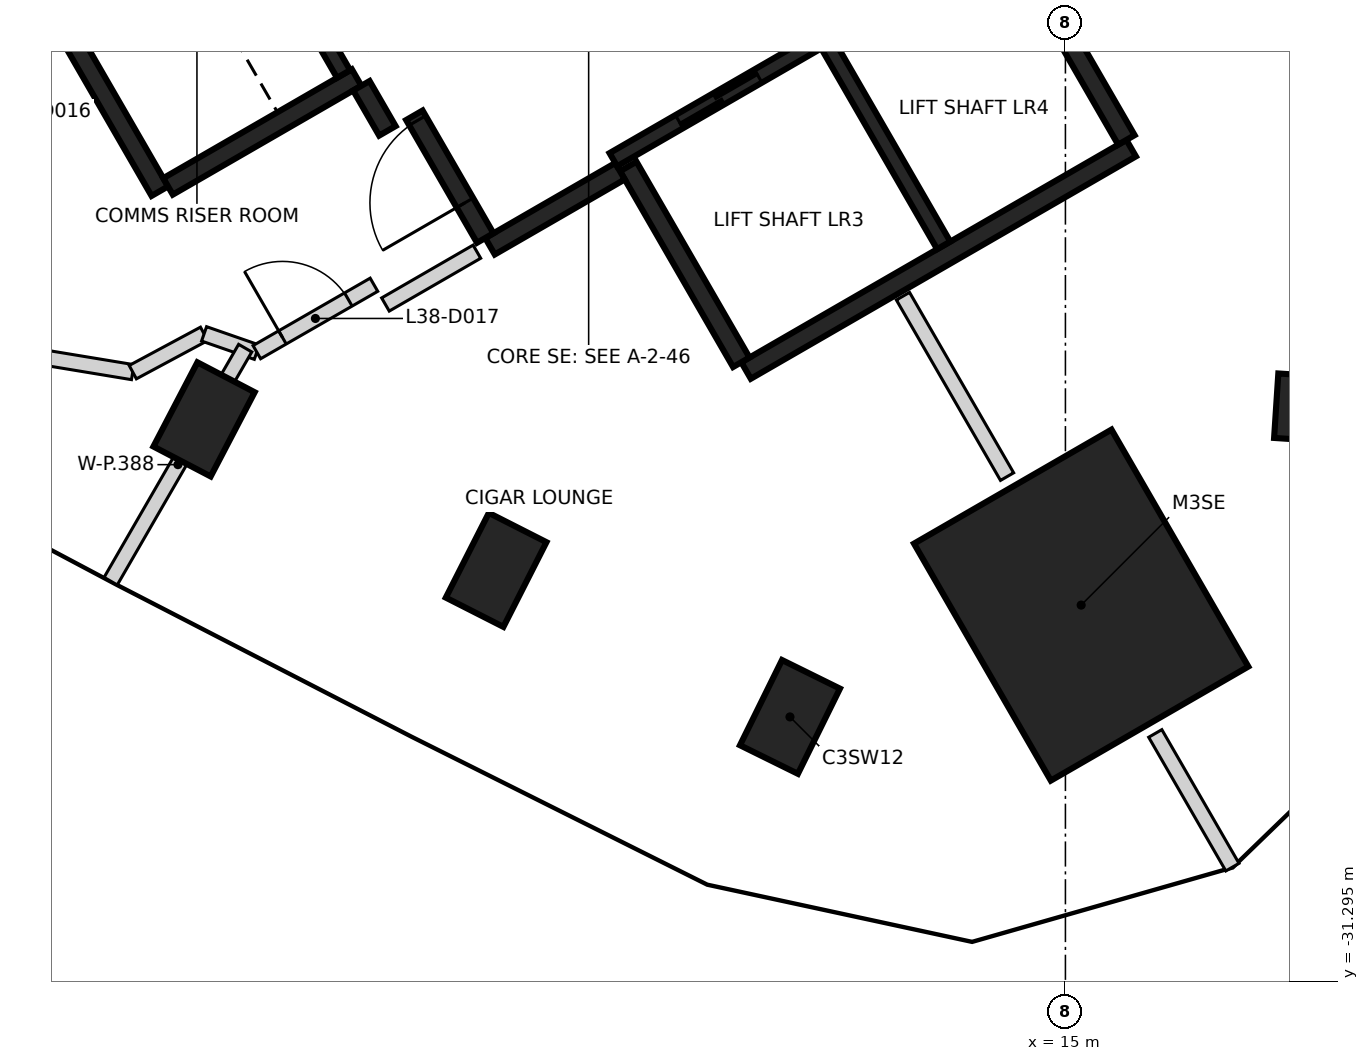
"""IFC4 building model, lengths in metres.
Left out: names, types, materials, properties, quantities, classifications, styles, units other than length and angle.
Written with IfcOpenShell. Run it as: python <this file> out.ifc"""

import sys

from ifc_helpers import new_model, si_unit, direction, frame, frame_2d, origin, origin_2d, place, context, subcontext, project, spatial, rectangle, extrude, element, fill, save


model = new_model("IFC4")
c1 = context("Model", 3, precision=1e-05, world=origin(), true_north=direction((0.0, 1.0)))
c2 = subcontext(c1, "Body", "Model", "MODEL_VIEW")
j1 = project(units=[si_unit("LENGTHUNIT", "METRE"), si_unit("PLANEANGLEUNIT", "RADIAN")], contexts=[c1])
p1 = place(None, origin())
s1 = spatial("IfcSite", under=j1, at=p1, CompositionType="ELEMENT")
p2 = place(p1, origin())
s2 = spatial("IfcBuilding", under=s1, at=p2, CompositionType="ELEMENT")
p3 = place(p2, frame((0.0, 0.0, 154.0)))
s3 = spatial("IfcBuildingStorey", under=s2, at=p3, CompositionType="ELEMENT", Elevation=154.0)
for number, where, z_axis, x_axis in (
    (1, (18.397, -23.757, -0.4), (0.0, 0.0, 1.0), (-0.998, 0.065, 0.0)),
    (2, (3.667, -23.896, -0.4), (0.0, 0.0, 1.0), (0.463, 0.886, 0.0)),
    (3, (7.51, -25.876, -0.4), (0.0, 0.0, 1.0), (0.453, 0.892, 0.0)),
    (4, (11.376, -27.811, -0.4), (0.0, 0.0, 1.0), (0.442, 0.897, 0.0)),
):
    element("IfcColumn", number, at=place(p3, frame(where, z_axis=z_axis, x_axis=x_axis)), inside=s3, PredefinedType="COLUMN", context=c2, shape_type="SweptSolid", body=[
        extrude(rectangle(XDim=1.25, YDim=0.85, at=origin_2d()), origin(), (0.0, 0.0, 1.0), 3.6),
    ])
p4 = place(p3, frame((15.207, -26.34, -0.4), z_axis=(0.0, 0.0, 1.0), x_axis=(-0.5, 0.866025403784, 0.0)))
e5 = element("IfcColumn", 5, at=p4, inside=s3, PredefinedType="COLUMN", context=c2, shape_type="SweptSolid", body=[
    extrude(rectangle(XDim=3.6, YDim=3.0, at=origin_2d()), origin(), (0.0, 0.0, 1.0), 3.6),
])
p5 = place(p3, frame((15.865, -20.328, 0.0), z_axis=(0.0, 0.0, 1.0), x_axis=(-0.86602852612, -0.499994591916, 0.0)))
e6 = element("IfcWall", 6, at=p5, inside=s3, PredefinedType="SHEAR", context=c2, shape_type="SweptSolid", body=[
    extrude(rectangle(XDim=5.85, YDim=0.25, at=frame_2d((2.925, 0.0))), origin(), (0.0, 0.0, 1.0), 3.2),
])
for number, where, z_axis, x_axis in (
    (7, (14.315, -17.644, 0.0), (0.0, 0.0, 1.0), (0.5, -0.866, 0.0)),
    (8, (10.736, -23.145, 0.0), (0.0, 0.0, 1.0), (-0.5, 0.866, 0.0)),
):
    element("IfcWall", number, at=place(p3, frame(where, z_axis=z_axis, x_axis=x_axis)), inside=s3, PredefinedType="SHEAR", context=c2, shape_type="SweptSolid", body=[
        extrude(rectangle(XDim=2.974, YDim=0.25, at=frame_2d((1.487, 0.0))), origin(), (0.0, 0.0, 1.0), 3.2),
    ])
p6 = place(p3, frame((3.085, -20.894, 0.0), z_axis=(0.0, 0.0, 1.0), x_axis=(-0.499978833458, 0.866037623948, 0.0)))
e9 = element("IfcWall", 9, at=p6, inside=s3, PredefinedType="SHEAR", context=c2, shape_type="SweptSolid", body=[
    extrude(rectangle(XDim=3.05, YDim=0.25, at=frame_2d((1.525, 0.0))), origin(), (0.0, 0.0, 1.0), 3.2),
])
p7 = place(p3, frame((5.675, -19.399, 0.0), z_axis=(0.0, 0.0, 1.0), x_axis=(-0.866026637627, -0.499997862916, 0.0)))
e10 = element("IfcWall", 10, at=p7, inside=s3, PredefinedType="SHEAR", context=c2, shape_type="SweptSolid", body=[
    extrude(rectangle(XDim=2.865, YDim=0.25, at=frame_2d((1.432, 0.0))), origin(), (0.0, 0.0, 1.0), 3.2),
])
p8 = place(p3, frame((9.14, -20.631, 0.0), z_axis=(0.0, 0.0, 1.0), x_axis=(-0.866043531843, -0.499968599967, 0.0)))
e11 = element("IfcWall", 11, at=p8, inside=s3, PredefinedType="SHEAR", context=c2, shape_type="SweptSolid", body=[
    extrude(rectangle(XDim=1.975, YDim=0.25, at=frame_2d((0.987, 0.0))), origin(), (0.0, 0.0, 1.0), 3.2),
])
p9 = place(p3, frame((7.367, -21.51, 0.0), z_axis=(0.0, 0.0, 1.0), x_axis=(-0.499983108224, 0.866035156036, 0.0)))
e12 = element("IfcWall", 12, at=p9, inside=s3, PredefinedType="SHEAR", context=c2, shape_type="SweptSolid", body=[
    extrude(rectangle(XDim=1.865, YDim=0.25, at=frame_2d((0.932, 0.0))), origin(), (0.0, 0.0, 1.0), 3.2),
])
p10 = place(p9, frame((0.535, 0.0, 0.0)))
e13 = element("IfcOpeningElement", 13, at=p10, cuts=e12, PredefinedType="OPENING", context=c2, shape_type="SweptSolid", body=[
    extrude(rectangle(XDim=1.25, YDim=2.1, at=frame_2d((0.625, 1.05))), frame((0.0, 0.135, 0.0), z_axis=(0.0, -1.0, 0.0), x_axis=(1.0, 0.0, 0.0)), (0.0, 0.0, 1.0), 0.27),
])
p11 = place(p3, frame((6.08, -20.1, 0.0), z_axis=(0.0, 0.0, 1.0), x_axis=(-0.500051773299, 0.865995510393, 0.0)))
e14 = element("IfcWall", 14, at=p11, inside=s3, PredefinedType="SHEAR", context=c2, shape_type="SweptSolid", body=[
    extrude(rectangle(XDim=0.685, YDim=0.25, at=frame_2d((0.342, 0.0))), origin(), (0.0, 0.0, 1.0), 3.2),
])
p12 = place(p3, frame((9.052, -20.48, 0.0), z_axis=(0.0, 0.0, 1.0), x_axis=(0.866030299012, 0.499991521122, 0.0)))
e15 = element("IfcWall", 15, at=p12, inside=s3, PredefinedType="SHEAR", context=c2, shape_type="SweptSolid", body=[
    extrude(rectangle(XDim=6.1, YDim=0.2, at=frame_2d((3.05, 0.0))), origin(), (0.0, 0.0, 1.0), 3.2),
])
p13 = place(p12, frame((1.0, 0.0, 0.0)))
e16 = element("IfcOpeningElement", 16, at=p13, cuts=e15, PredefinedType="OPENING", context=c2, shape_type="SweptSolid", body=[
    extrude(rectangle(XDim=1.2, YDim=2.1, at=frame_2d((0.6, 1.05))), frame((0.0, 0.11, 0.0), z_axis=(0.0, -1.0, 0.0), x_axis=(1.0, 0.0, 0.0)), (0.0, 0.0, 1.0), 0.22),
])
p14 = place(p12, frame((4.05, 0.0, 0.0)))
e17 = element("IfcOpeningElement", 17, at=p14, cuts=e15, PredefinedType="OPENING", context=c2, shape_type="SweptSolid", body=[
    extrude(rectangle(XDim=1.2, YDim=2.1, at=frame_2d((0.6, 1.05))), frame((0.0, 0.11, 0.0), z_axis=(0.0, -1.0, 0.0), x_axis=(1.0, 0.0, 0.0)), (0.0, 0.0, 1.0), 0.22),
])
p15 = place(p3, frame((11.875, -18.967, 0.0), z_axis=(0.0, 0.0, 1.0), x_axis=(0.49998131003, -0.866036194175, 0.0)))
e18 = element("IfcWall", 18, at=p15, inside=s3, PredefinedType="SHEAR", context=c2, shape_type="SweptSolid", body=[
    extrude(rectangle(XDim=3.048, YDim=0.2, at=frame_2d((1.524, 0.0))), origin(), (0.0, 0.0, 1.0), 3.2),
])
p16 = place(p3, frame((5.503, -19.352, 0.0), z_axis=(0.0, 0.0, 1.0), x_axis=(-0.499986818241, 0.866033014143, 0.0)))
e19 = element("IfcWall", 19, at=p16, inside=s3, PredefinedType="SHEAR", context=c2, shape_type="SweptSolid", body=[
    extrude(rectangle(XDim=2.798, YDim=0.2, at=frame_2d((1.399, 0.0))), origin(), (0.0, 0.0, 1.0), 3.2),
])
p17 = place(p16, frame((0.949, 0.0, 0.0)))
e20 = element("IfcOpeningElement", 20, at=p17, cuts=e19, PredefinedType="OPENING", context=c2, shape_type="SweptSolid", body=[
    extrude(rectangle(XDim=0.9, YDim=2.1, at=frame_2d((0.45, 1.05))), frame((0.0, 0.11, 0.0), z_axis=(0.0, -1.0, 0.0), x_axis=(1.0, 0.0, 0.0)), (0.0, 0.0, 1.0), 0.22),
])
p18 = place(p3, frame((1.584, -23.086, 0.0), z_axis=(0.0, 0.0, 1.0), x_axis=(0.986654221629, -0.162829502674, 0.0)))
e21 = element("IfcWall", 21, at=p18, inside=s3, PredefinedType="PARTITIONING", context=c2, shape_type="SweptSolid", body=[
    extrude(rectangle(XDim=1.16, YDim=0.2, at=frame_2d((0.58, 0.0))), origin(), (0.0, 0.0, 1.0), 2.3),
])
p19 = place(p3, frame((2.73, -23.275, 0.0), z_axis=(0.0, 0.0, 1.0), x_axis=(0.880927165636, 0.473251866182, 0.0)))
e22 = element("IfcWall", 22, at=p19, inside=s3, PredefinedType="PARTITIONING", context=c2, shape_type="SweptSolid", body=[
    extrude(rectangle(XDim=1.065, YDim=0.2, at=frame_2d((0.532, 0.0))), origin(), (0.0, 0.0, 1.0), 3.2),
])
p20 = place(p3, frame((3.668, -22.771, 0.0), z_axis=(0.0, 0.0, 1.0), x_axis=(0.944447470761, -0.328662402738, 0.0)))
e23 = element("IfcWall", 23, at=p20, inside=s3, PredefinedType="PARTITIONING", context=c2, shape_type="SweptSolid", body=[
    extrude(rectangle(XDim=0.735, YDim=0.2, at=frame_2d((0.367, 0.0))), origin(), (0.0, 0.0, 1.0), 3.2),
])
p21 = place(p3, frame((4.362, -23.012, 0.0), z_axis=(0.0, 0.0, 1.0), x_axis=(0.866692617793, 0.49884256661, 0.0)))
e24 = element("IfcWall", 24, at=p21, inside=s3, PredefinedType="PARTITIONING", context=c2, shape_type="SweptSolid", body=[
    extrude(rectangle(XDim=1.778, YDim=0.2, at=frame_2d((0.889, 0.0))), origin(), (0.0, 0.0, 1.0), 3.2),
])
p22 = place(p21, frame((0.389, 0.0, 0.0)))
e25 = element("IfcOpeningElement", 25, at=p22, cuts=e24, PredefinedType="OPENING", context=c2, shape_type="SweptSolid", body=[
    extrude(rectangle(XDim=1.0, YDim=2.1, at=frame_2d((0.5, 1.05))), frame((0.0, 0.11, 0.0), z_axis=(0.0, -1.0, 0.0), x_axis=(1.0, 0.0, 0.0)), (0.0, 0.0, 1.0), 0.22),
])
p23 = place(p3, frame((6.054, -22.385, 0.0), z_axis=(0.0, 0.0, 1.0), x_axis=(0.86593101922, 0.500163443238, 0.0)))
e26 = element("IfcWall", 26, at=p23, inside=s3, PredefinedType="PARTITIONING", context=c2, shape_type="SweptSolid", body=[
    extrude(rectangle(XDim=1.39, YDim=0.2, at=frame_2d((0.695, 0.0))), origin(), (0.0, 0.0, 1.0), 3.2),
])
p24 = place(p3, frame((2.439, -26.024, 0.0), z_axis=(0.0, 0.0, 1.0), x_axis=(0.499989137667, 0.866031675065, 0.0)))
e27 = element("IfcWall", 27, at=p24, inside=s3, PredefinedType="PARTITIONING", context=c2, shape_type="SweptSolid", body=[
    extrude(rectangle(XDim=3.54, YDim=0.2, at=frame_2d((1.77, 0.0))), origin(), (0.0, 0.0, 1.0), 3.2),
])
p25 = place(p3, frame((12.863, -22.275, 0.0), z_axis=(0.0, 0.0, 1.0), x_axis=(0.49982784299, -0.866124775868, 0.0)))
e28 = element("IfcWall", 28, at=p25, inside=s3, PredefinedType="PARTITIONING", context=c2, shape_type="SweptSolid", body=[
    extrude(rectangle(XDim=2.741, YDim=0.2, at=frame_2d((1.37, 0.0))), origin(), (0.0, 0.0, 1.0), 3.2),
])
p26 = place(p3, frame((16.182, -28.028, 0.0), z_axis=(0.0, 0.0, 1.0), x_axis=(0.499836922991, -0.86611953587, 0.0)))
e29 = element("IfcWall", 29, at=p26, inside=s3, PredefinedType="PARTITIONING", context=c2, shape_type="SweptSolid", body=[
    extrude(rectangle(XDim=2.031, YDim=0.2, at=frame_2d((1.016, 0.0))), origin(), (0.0, 0.0, 1.0), 3.2),
])
p27 = place(p13, origin())
e30 = element("IfcDoor", 30, at=p27, inside=s3, OperationType="DOUBLE_DOOR_SLIDING", PredefinedType="DOOR", context=c2, shape_type="SweptSolid", body=[
    extrude(rectangle(XDim=1.2, YDim=2.1, at=frame_2d((0.6, 1.05))), frame((0.0, 0.025, 0.0), z_axis=(0.0, -1.0, 0.0), x_axis=(1.0, 0.0, 0.0)), (0.0, 0.0, 1.0), 0.05),
])
fill(e16, e30)
p28 = place(p10, origin())
e31 = element("IfcDoor", 31, at=p28, inside=s3, OperationType="SINGLE_SWING_LEFT", PredefinedType="DOOR", context=c2, shape_type="SweptSolid", body=[
    extrude(rectangle(XDim=1.25, YDim=2.1, at=frame_2d((0.625, 1.05))), frame((0.0, 0.025, 0.0), z_axis=(0.0, -1.0, 0.0), x_axis=(1.0, 0.0, 0.0)), (0.0, 0.0, 1.0), 0.05),
])
fill(e13, e31)
p29 = place(p22, frame((1.0, 0.0, 0.0), z_axis=(0.0, 0.0, 1.0), x_axis=(-1.0, 0.0, 0.0)))
e32 = element("IfcDoor", 32, at=p29, inside=s3, OperationType="SINGLE_SWING_LEFT", PredefinedType="DOOR", context=c2, shape_type="SweptSolid", body=[
    extrude(rectangle(XDim=1.0, YDim=2.1, at=frame_2d((0.5, 1.05))), frame((0.0, 0.025, 0.0), z_axis=(0.0, -1.0, 0.0), x_axis=(1.0, 0.0, 0.0)), (0.0, 0.0, 1.0), 0.05),
])
fill(e25, e32)
save(model, sys.argv[1])
